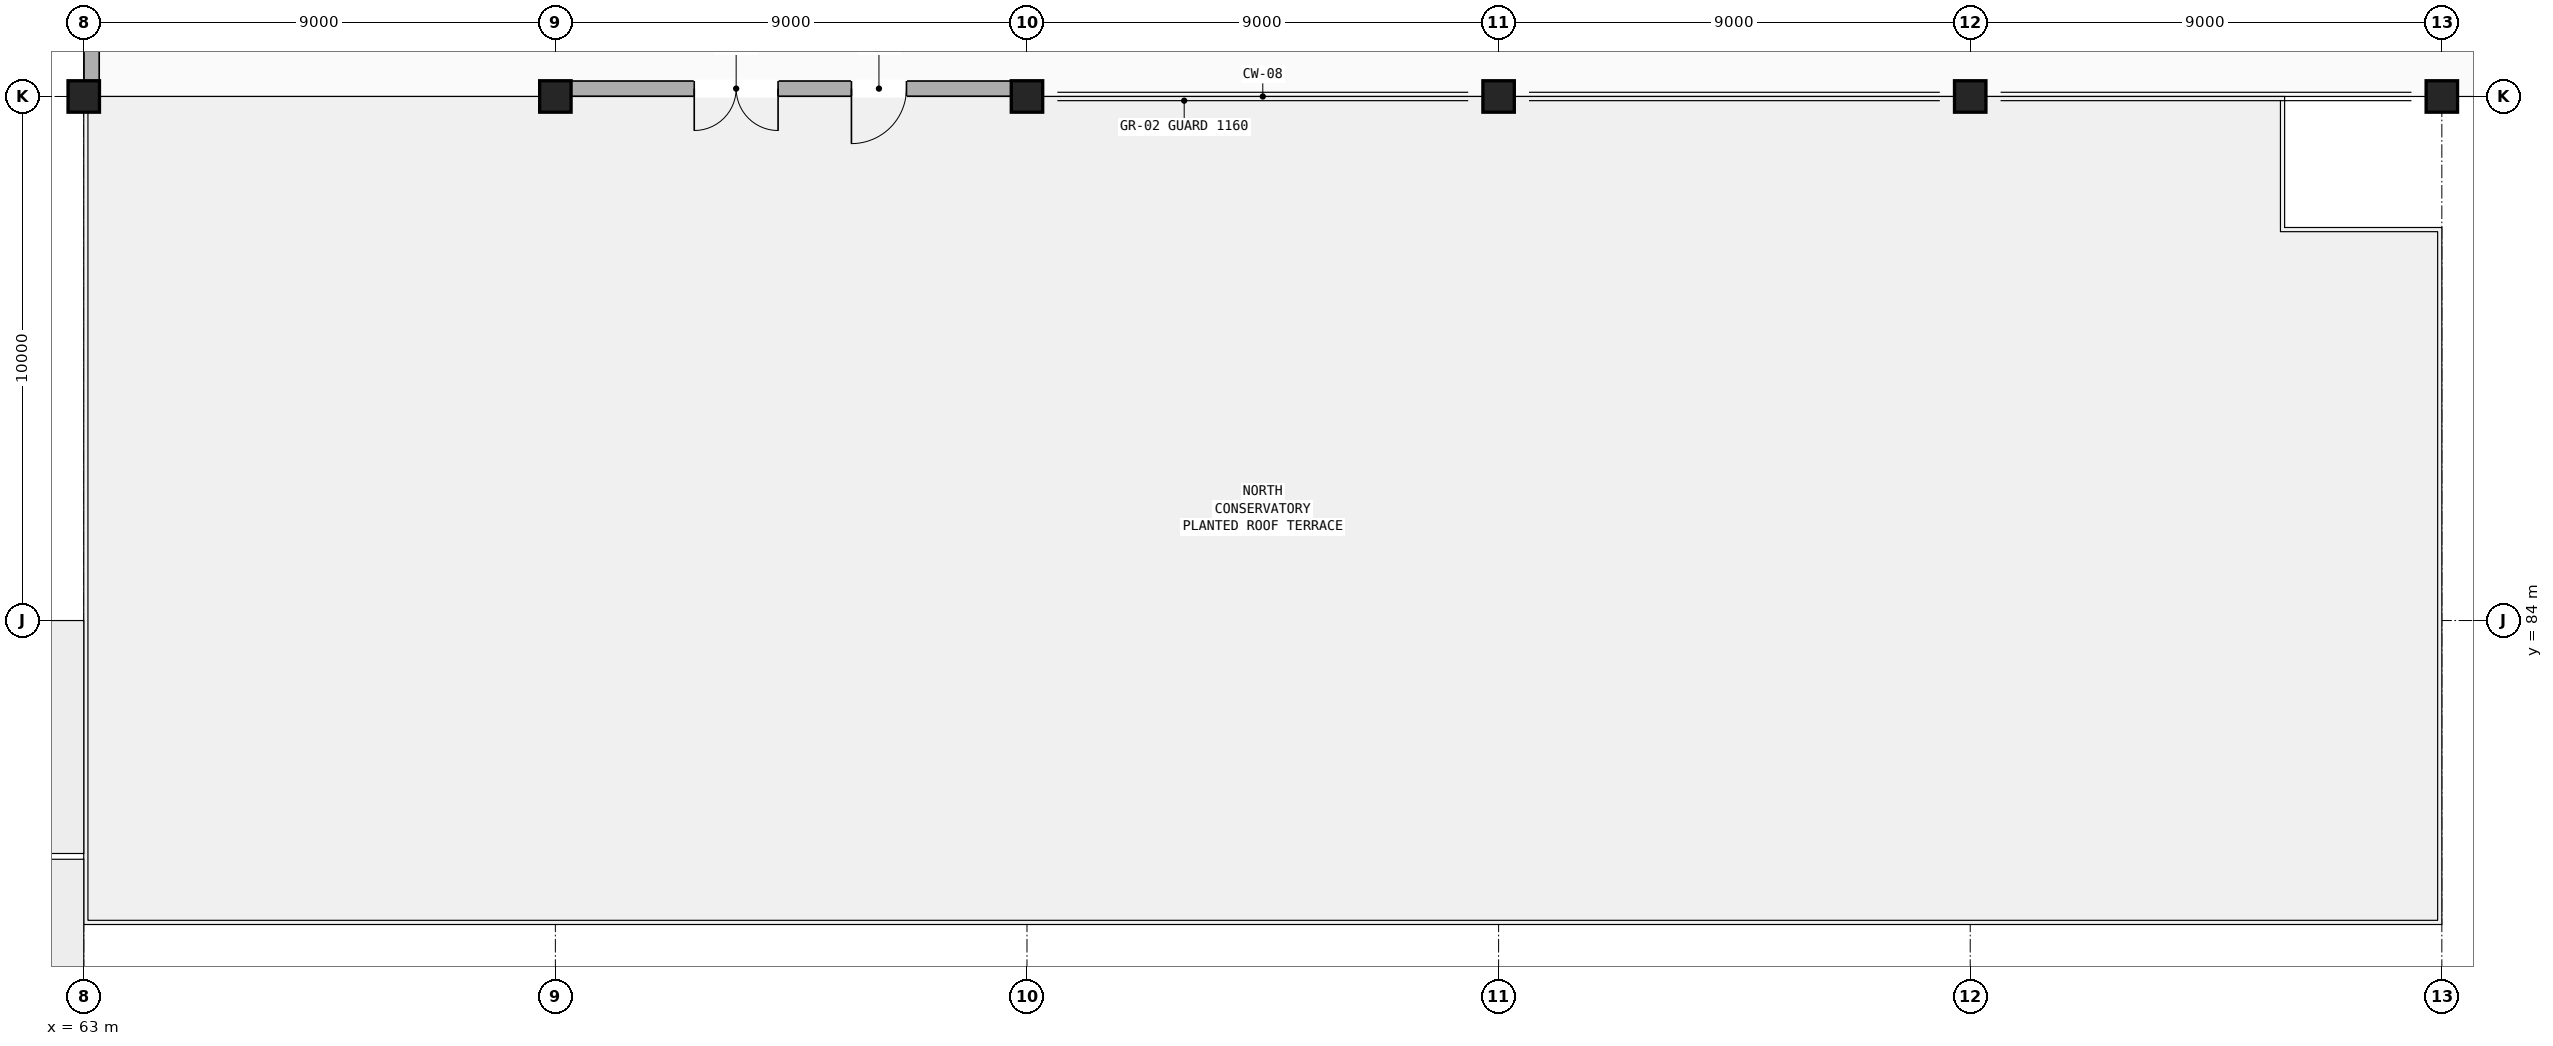
"""IFC4 building model, lengths in metres.
Left out: names, types, materials, properties, quantities, classifications, styles, units other than length and angle.
Written with IfcOpenShell. Run it as: python <this file> out.ifc"""

import sys

from ifc_helpers import new_model, si_unit, direction, frame, frame_2d, origin, origin_2d, place, context, subcontext, project, spatial, rectangle, extrude, element, fill, save


model = new_model("IFC4")
c1 = context("Model", 3, precision=1e-05, world=origin(), true_north=direction((0.0, 1.0)))
c2 = subcontext(c1, "Body", "Model", "MODEL_VIEW")
j1 = project(units=[si_unit("LENGTHUNIT", "METRE"), si_unit("PLANEANGLEUNIT", "RADIAN")], contexts=[c1])
p1 = place(None, origin())
s1 = spatial("IfcSite", under=j1, at=p1, CompositionType="ELEMENT")
p2 = place(p1, origin())
s2 = spatial("IfcBuilding", under=s1, at=p2, CompositionType="ELEMENT")
p3 = place(p2, frame((0.0, 0.0, 17.68)))
s3 = spatial("IfcBuildingStorey", under=s2, at=p3, CompositionType="ELEMENT", Elevation=17.68)
for number, where, z_axis, x_axis in (
    (1, (81.0, 94.0, 0.0), (0.0, 0.0, 1.0), (1.0, 0.0, 0.0)),
    (2, (90.0, 94.0, 0.0), (0.0, 0.0, 1.0), (1.0, 0.0, 0.0)),
    (3, (99.0, 94.0, 0.0), (0.0, 0.0, 1.0), (1.0, 0.0, 0.0)),
    (4, (108.0, 94.0, 0.0), (0.0, 0.0, 1.0), (1.0, 0.0, 0.0)),
    (5, (63.0, 94.0, 0.0), (0.0, 0.0, 1.0), (1.0, 0.0, 0.0)),
    (6, (72.0, 94.0, 0.0), (0.0, 0.0, 1.0), (1.0, 0.0, 0.0)),
):
    element("IfcColumn", number, at=place(p3, frame(where, z_axis=z_axis, x_axis=x_axis)), inside=s3, PredefinedType="COLUMN", context=c2, shape_type="SweptSolid", body=[
        extrude(rectangle(XDim=0.6, YDim=0.6, at=origin_2d()), origin(), (0.0, 0.0, 1.0), 4.08),
    ])
p4 = place(p3, frame((63.15, 94.3, 0.0), z_axis=(0.0, 0.0, 1.0), x_axis=(0.0, 1.0, 0.0)))
e7 = element("IfcWall", 7, at=p4, inside=s3, PredefinedType="STANDARD", context=c2, shape_type="SweptSolid", body=[
    extrude(rectangle(XDim=8.4, YDim=0.29, at=frame_2d((4.2, 0.0))), origin(), (0.0, 0.0, 1.0), 3.277),
])
p5 = place(p4, frame((1.35, 0.0, 0.9)))
e8 = element("IfcOpeningElement", 8, at=p5, cuts=e7, PredefinedType="OPENING", context=c2, shape_type="SweptSolid", body=[
    extrude(rectangle(XDim=1.48, YDim=1.9, at=frame_2d((0.74, 0.95))), frame((0.0, 0.155, 0.0), z_axis=(0.0, -1.0, 0.0), x_axis=(1.0, 0.0, 0.0)), (0.0, 0.0, 1.0), 0.31),
])
p6 = place(p3, frame((72.3, 94.15, 0.0), z_axis=(0.0, 0.0, 1.0), x_axis=(1.0, 0.0, 0.0)))
e9 = element("IfcWall", 9, at=p6, inside=s3, PredefinedType="STANDARD", context=c2, shape_type="SweptSolid", body=[
    extrude(rectangle(XDim=8.4, YDim=0.29, at=frame_2d((4.2, 0.0))), origin(), (0.0, 0.0, 1.0), 3.277),
])
p7 = place(p6, frame((2.35, 0.0, 0.0)))
e10 = element("IfcOpeningElement", 10, at=p7, cuts=e9, PredefinedType="OPENING", context=c2, shape_type="SweptSolid", body=[
    extrude(rectangle(XDim=1.6, YDim=2.25, at=frame_2d((0.8, 1.125))), frame((0.0, 0.155, 0.0), z_axis=(0.0, -1.0, 0.0), x_axis=(1.0, 0.0, 0.0)), (0.0, 0.0, 1.0), 0.31),
])
p8 = place(p6, frame((5.35, 0.0, 0.0)))
e11 = element("IfcOpeningElement", 11, at=p8, cuts=e9, PredefinedType="OPENING", context=c2, shape_type="SweptSolid", body=[
    extrude(rectangle(XDim=1.05, YDim=2.2, at=frame_2d((0.525, 1.1))), frame((0.0, 0.155, 0.0), z_axis=(0.0, -1.0, 0.0), x_axis=(1.0, 0.0, 0.0)), (0.0, 0.0, 1.0), 0.31),
])
p9 = place(p7, frame((1.6, 0.0, 0.0), z_axis=(0.0, 0.0, 1.0), x_axis=(-1.0, 0.0, 0.0)))
e12 = element("IfcDoor", 12, at=p9, inside=s3, OperationType="DOUBLE_DOOR_SINGLE_SWING", PredefinedType="DOOR", context=c2, shape_type="SweptSolid", body=[
    extrude(rectangle(XDim=1.6, YDim=2.25, at=frame_2d((0.8, 1.125))), frame((0.0, 0.025, 0.0), z_axis=(0.0, -1.0, 0.0), x_axis=(1.0, 0.0, 0.0)), (0.0, 0.0, 1.0), 0.05),
])
fill(e10, e12)
p10 = place(p8, frame((1.05, 0.0, 0.0), z_axis=(0.0, 0.0, 1.0), x_axis=(-1.0, 0.0, 0.0)))
e13 = element("IfcDoor", 13, at=p10, inside=s3, OperationType="SINGLE_SWING_RIGHT", PredefinedType="DOOR", context=c2, shape_type="SweptSolid", body=[
    extrude(rectangle(XDim=1.05, YDim=2.2, at=frame_2d((0.525, 1.1))), frame((0.0, 0.025, 0.0), z_axis=(0.0, -1.0, 0.0), x_axis=(1.0, 0.0, 0.0)), (0.0, 0.0, 1.0), 0.05),
])
fill(e11, e13)
save(model, sys.argv[1])
